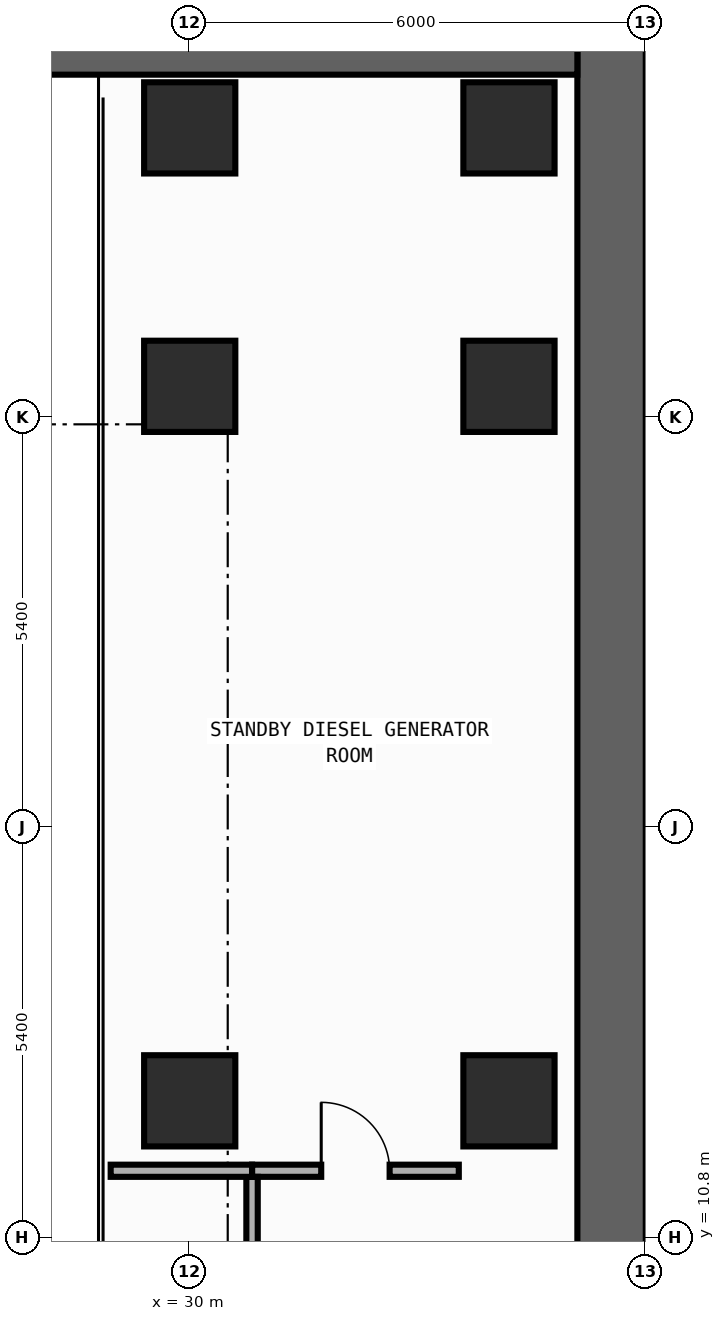
"""IFC4 building model, lengths in metres.
Left out: names, types, materials, properties, quantities, classifications, styles, units other than length and angle.
Written with IfcOpenShell. Run it as: python <this file> out.ifc"""

import sys

from ifc_helpers import new_model, si_unit, direction, frame, frame_2d, origin, origin_2d, place, context, subcontext, project, spatial, rectangle, extrude, element, fill, save


model = new_model("IFC4")
c1 = context("Model", 3, precision=1e-05, world=origin(), true_north=direction((0.0, 1.0)))
c2 = subcontext(c1, "Body", "Model", "MODEL_VIEW")
j1 = project(units=[si_unit("LENGTHUNIT", "METRE"), si_unit("PLANEANGLEUNIT", "RADIAN")], contexts=[c1])
p1 = place(None, origin())
s1 = spatial("IfcSite", under=j1, at=p1, CompositionType="ELEMENT")
p2 = place(p1, origin())
s2 = spatial("IfcBuilding", under=s1, at=p2, CompositionType="ELEMENT")
p3 = place(p2, frame((0.0, 0.0, -4.5)))
s3 = spatial("IfcBuildingStorey", under=s2, at=p3, CompositionType="ELEMENT", Elevation=-4.5)
p4 = place(p3, frame((35.55, -27.0, 0.0), z_axis=(0.0, 0.0, 1.0), x_axis=(0.0, 1.0, 0.0)))
e1 = element("IfcWall", 1, at=p4, inside=s3, PredefinedType="SHEAR", context=c2, shape_type="SweptSolid", body=[
    extrude(rectangle(XDim=54.0, YDim=0.9, at=frame_2d((27.0, 0.0))), origin(), (0.0, 0.0, 1.0), 4.2),
])
p5 = place(p3, frame((-35.1, 26.55, 0.0), z_axis=(0.0, 0.0, 1.0), x_axis=(1.0, 0.0, 0.0)))
e2 = element("IfcWall", 2, at=p5, inside=s3, PredefinedType="SHEAR", context=c2, shape_type="SweptSolid", body=[
    extrude(rectangle(XDim=70.2, YDim=0.9, at=frame_2d((35.1, 0.0))), origin(), (0.0, 0.0, 1.0), 4.2),
])
for number, where, z_axis, x_axis in (
    (3, (30.0, 12.6, 0.0), (0.0, 0.0, 1.0), (1.0, 0.0, 0.0)),
    (4, (30.0, 22.0, 0.0), (0.0, 0.0, 1.0), (1.0, 0.0, 0.0)),
    (5, (30.0, 25.4, 0.0), (0.0, 0.0, 1.0), (1.0, 0.0, 0.0)),
    (6, (34.2, 12.6, 0.0), (0.0, 0.0, 1.0), (1.0, 0.0, 0.0)),
    (7, (34.2, 22.0, 0.0), (0.0, 0.0, 1.0), (1.0, 0.0, 0.0)),
    (8, (34.2, 25.4, 0.0), (0.0, 0.0, 1.0), (1.0, 0.0, 0.0)),
):
    element("IfcColumn", number, at=place(p3, frame(where, z_axis=z_axis, x_axis=x_axis)), inside=s3, PredefinedType="COLUMN", context=c2, shape_type="SweptSolid", body=[
        extrude(rectangle(XDim=1.2, YDim=1.2, at=origin_2d()), origin(), (0.0, 0.0, 1.0), 4.5),
    ])
p6 = place(p3, frame((30.82, 11.68, 0.0), z_axis=(0.0, 0.0, 1.0), x_axis=(1.0, 0.0, 0.0)))
e9 = element("IfcWall", 9, at=p6, inside=s3, PredefinedType="PARTITIONING", context=c2, shape_type="SweptSolid", body=[
    extrude(rectangle(XDim=2.72, YDim=0.16, at=frame_2d((1.36, 0.0))), origin(), (0.0, 0.0, 1.0), 4.2),
])
p7 = place(p6, frame((0.91, 0.0, 0.0)))
e10 = element("IfcOpeningElement", 10, at=p7, cuts=e9, PredefinedType="OPENING", context=c2, shape_type="SweptSolid", body=[
    extrude(rectangle(XDim=0.9, YDim=2.15, at=frame_2d((0.45, 1.075))), frame((0.0, 0.09, 0.0), z_axis=(0.0, -1.0, 0.0), x_axis=(1.0, 0.0, 0.0)), (0.0, 0.0, 1.0), 0.18),
])
p8 = place(p3, frame((30.82, -4.425, 0.0), z_axis=(0.0, 0.0, 1.0), x_axis=(0.0, 1.0, 0.0)))
e11 = element("IfcWall", 11, at=p8, inside=s3, PredefinedType="PARTITIONING", context=c2, shape_type="SweptSolid", body=[
    extrude(rectangle(XDim=16.025, YDim=0.15, at=frame_2d((8.013, 0.0))), origin(), (0.0, 0.0, 1.0), 4.2),
])
p9 = place(p8, frame((5.662, 0.0, 0.0)))
e12 = element("IfcOpeningElement", 12, at=p9, cuts=e11, PredefinedType="OPENING", context=c2, shape_type="SweptSolid", body=[
    extrude(rectangle(XDim=0.9, YDim=2.15, at=frame_2d((0.45, 1.075))), frame((0.0, 0.085, 0.0), z_axis=(0.0, -1.0, 0.0), x_axis=(1.0, 0.0, 0.0)), (0.0, 0.0, 1.0), 0.17),
])
p10 = place(p3, frame((28.96, 11.68, 0.0), z_axis=(0.0, 0.0, 1.0), x_axis=(1.0, 0.0, 0.0)))
e13 = element("IfcWall", 13, at=p10, inside=s3, PredefinedType="PARTITIONING", context=c2, shape_type="SweptSolid", body=[
    extrude(rectangle(XDim=1.86, YDim=0.16, at=frame_2d((0.93, 0.0))), origin(), (0.0, 0.0, 1.0), 4.2),
])
p11 = place(p7, origin())
e14 = element("IfcDoor", 14, at=p11, inside=s3, OperationType="SINGLE_SWING_LEFT", PredefinedType="DOOR", context=c2, shape_type="SweptSolid", body=[
    extrude(rectangle(XDim=0.9, YDim=2.15, at=frame_2d((0.45, 1.075))), frame((0.0, 0.025, 0.0), z_axis=(0.0, -1.0, 0.0), x_axis=(1.0, 0.0, 0.0)), (0.0, 0.0, 1.0), 0.05),
])
fill(e10, e14)
save(model, sys.argv[1])
